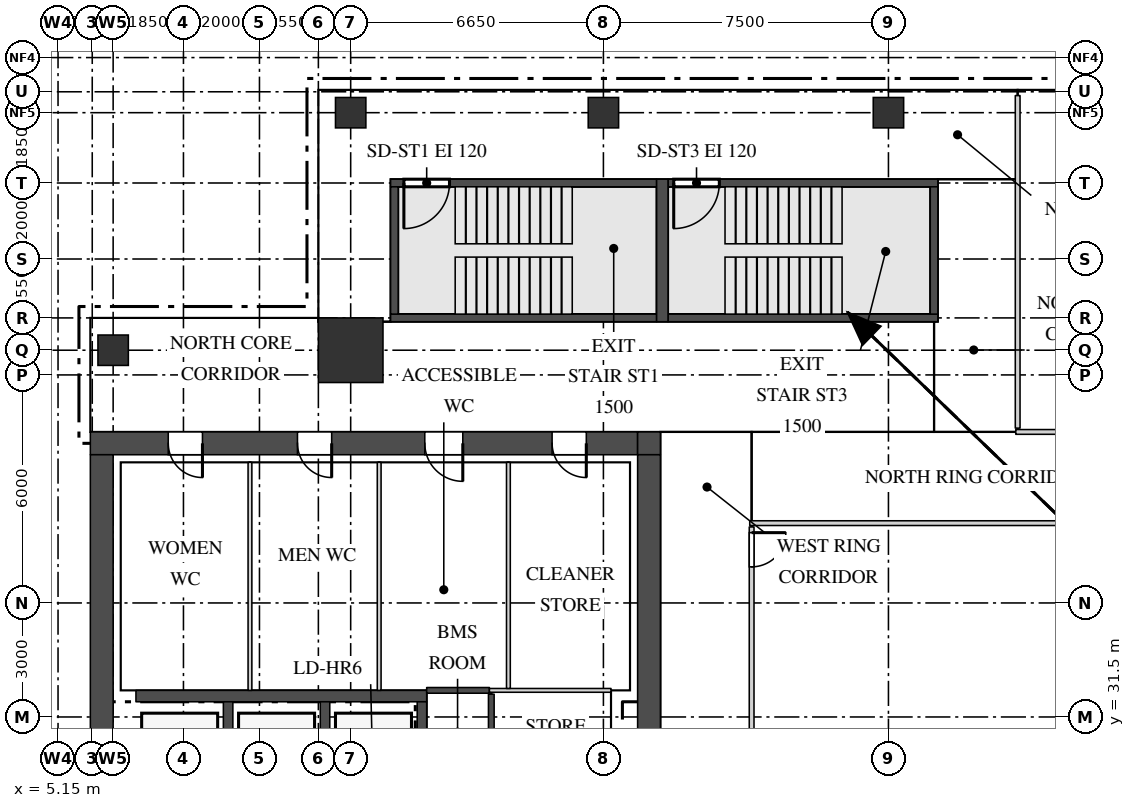
"""IFC4 building model, lengths in metres.
Left out: names, types, materials, properties, quantities, classifications, styles, units other than length and angle.
Written with IfcOpenShell. Run it as: python <this file> out.ifc"""

import sys

from ifc_helpers import new_model, si_unit, direction, frame, frame_2d, origin, origin_2d, place, context, subcontext, project, spatial, rectangle, extrude, source, transform, mapped, element, fill, save


model = new_model("IFC4")
c1 = context("Model", 3, precision=1e-05, world=origin(), true_north=direction((0.0, 1.0)))
c2 = subcontext(c1, "Body", "Model", "MODEL_VIEW")
j1 = project(units=[si_unit("LENGTHUNIT", "METRE"), si_unit("PLANEANGLEUNIT", "RADIAN")], contexts=[c1])
p1 = place(None, origin())
s1 = spatial("IfcSite", under=j1, at=p1, CompositionType="ELEMENT")
p2 = place(p1, origin())
s2 = spatial("IfcBuilding", under=s1, at=p2, CompositionType="ELEMENT")
p3 = place(p2, frame((0.0, 0.0, 318.2)))
s3 = spatial("IfcBuildingStorey", under=s2, at=p3, CompositionType="ELEMENT", Elevation=318.2)
m1 = source(origin(), c2, "Body", "SweptSolid", [
    extrude(rectangle(XDim=14.4, YDim=0.6, at=frame_2d((7.2, 0.0))), origin(), (0.0, 0.0, 1.0), 3.75),
])
p4 = place(p3, frame((6.0, 38.7, 0.0), z_axis=(0.0, 0.0, 1.0), x_axis=(1.0, 0.0, 0.0)))
e1 = element("IfcWall", 1, at=p4, inside=s3, PredefinedType="SHEAR", context=c2, shape_type="MappedRepresentation", body=[
    mapped(m1, transform((0.0, 0.0, 0.0))),
])
m2 = source(origin(), c2, "Body", "SweptSolid", [
    extrude(rectangle(XDim=0.9, YDim=2.1, at=frame_2d((0.45, 1.05))), frame((0.0, 0.31, 0.0), z_axis=(0.0, -1.0, 0.0), x_axis=(1.0, 0.0, 0.0)), (0.0, 0.0, 1.0), 0.62),
])
p5 = place(p4, frame((2.05, 0.0, 0.0)))
e2 = element("IfcOpeningElement", 2, at=p5, cuts=e1, PredefinedType="OPENING", context=c2, shape_type="MappedRepresentation", body=[
    mapped(m2, transform((0.0, 0.0, 0.0))),
])
p6 = place(p4, frame((5.45, 0.0, 0.0)))
e3 = element("IfcOpeningElement", 3, at=p6, cuts=e1, PredefinedType="OPENING", context=c2, shape_type="MappedRepresentation", body=[
    mapped(m2, transform((0.0, 0.0, 0.0))),
])
m3 = source(origin(), c2, "Body", "SweptSolid", [
    extrude(rectangle(XDim=1.0, YDim=2.1, at=frame_2d((0.5, 1.05))), frame((0.0, 0.31, 0.0), z_axis=(0.0, -1.0, 0.0), x_axis=(1.0, 0.0, 0.0)), (0.0, 0.0, 1.0), 0.62),
])
p7 = place(p4, frame((8.8, 0.0, 0.0)))
e4 = element("IfcOpeningElement", 4, at=p7, cuts=e1, PredefinedType="OPENING", context=c2, shape_type="MappedRepresentation", body=[
    mapped(m3, transform((0.0, 0.0, 0.0))),
])
p8 = place(p4, frame((12.15, 0.0, 0.0)))
e5 = element("IfcOpeningElement", 5, at=p8, cuts=e1, PredefinedType="OPENING", context=c2, shape_type="MappedRepresentation", body=[
    mapped(m2, transform((0.0, 0.0, 0.0))),
])
m4 = source(origin(), c2, "Body", "SweptSolid", [
    extrude(rectangle(XDim=0.6, YDim=0.6, at=frame_2d((0.3, 0.0))), origin(), (0.0, 0.0, 1.0), 3.75),
])
p9 = place(p3, frame((20.4, 38.7, 0.0), z_axis=(0.0, 0.0, 1.0), x_axis=(1.0, 0.0, 0.0)))
e6 = element("IfcWall", 6, at=p9, inside=s3, PredefinedType="SHEAR", context=c2, shape_type="MappedRepresentation", body=[
    mapped(m4, transform((0.0, 0.0, 0.0))),
])
m5 = source(origin(), c2, "Body", "SweptSolid", [
    extrude(rectangle(XDim=22.8, YDim=0.6, at=frame_2d((11.4, 0.0))), origin(), (0.0, 0.0, 1.0), 3.75),
])
p10 = place(p3, frame((20.7, 15.6, 0.0), z_axis=(0.0, 0.0, 1.0), x_axis=(0.0, 1.0, 0.0)))
e7 = element("IfcWall", 7, at=p10, inside=s3, PredefinedType="SHEAR", context=c2, shape_type="MappedRepresentation", body=[
    mapped(m5, transform((0.0, 0.0, 0.0))),
])
m6 = source(origin(), c2, "Body", "SweptSolid", [
    extrude(rectangle(XDim=1.8, YDim=2.1, at=frame_2d((0.9, 1.05))), frame((0.0, 0.31, 0.0), z_axis=(0.0, -1.0, 0.0), x_axis=(1.0, 0.0, 0.0)), (0.0, 0.0, 1.0), 0.62),
])
p11 = place(p10, frame((10.9, 0.0, 0.0)))
e8 = element("IfcOpeningElement", 8, at=p11, cuts=e7, PredefinedType="OPENING", context=c2, shape_type="MappedRepresentation", body=[
    mapped(m6, transform((0.0, 0.0, 0.0))),
])
p12 = place(p10, frame((0.55, 0.0, 0.0)))
e9 = element("IfcOpeningElement", 9, at=p12, cuts=e7, PredefinedType="OPENING", context=c2, shape_type="MappedRepresentation", body=[
    mapped(m2, transform((0.0, 0.0, 0.0))),
])
p13 = place(p10, frame((4.1, 0.0, 0.0)))
e10 = element("IfcOpeningElement", 10, at=p13, cuts=e7, PredefinedType="OPENING", context=c2, shape_type="MappedRepresentation", body=[
    mapped(m2, transform((0.0, 0.0, 0.0))),
])
p14 = place(p3, frame((6.3, 15.6, 0.0), z_axis=(0.0, 0.0, 1.0), x_axis=(0.0, 1.0, 0.0)))
e11 = element("IfcWall", 11, at=p14, inside=s3, PredefinedType="SHEAR", context=c2, shape_type="MappedRepresentation", body=[
    mapped(m5, transform((0.0, 0.0, 0.0))),
])
m7 = source(origin(), c2, "Body", "SweptSolid", [
    extrude(rectangle(XDim=7.0, YDim=0.2, at=frame_2d((3.5, 0.0))), origin(), (0.0, 0.0, 1.0), 3.75),
])
p15 = place(p3, frame((13.9, 45.55, 0.0), z_axis=(0.0, 0.0, 1.0), x_axis=(1.0, 0.0, 0.0)))
e12 = element("IfcWall", 12, at=p15, inside=s3, PredefinedType="SHEAR", context=c2, shape_type="MappedRepresentation", body=[
    mapped(m7, transform((0.0, 0.0, 0.0))),
])
m8 = source(origin(), c2, "Body", "SweptSolid", [
    extrude(rectangle(XDim=1.2, YDim=2.1, at=frame_2d((0.6, 1.05))), frame((0.0, 0.11, 0.0), z_axis=(0.0, -1.0, 0.0), x_axis=(1.0, 0.0, 0.0)), (0.0, 0.0, 1.0), 0.22),
])
p16 = place(p15, frame((0.35, 0.0, 0.0)))
e13 = element("IfcOpeningElement", 13, at=p16, cuts=e12, PredefinedType="OPENING", context=c2, shape_type="MappedRepresentation", body=[
    mapped(m8, transform((0.0, 0.0, 0.0))),
])
p17 = place(p3, frame((13.9, 42.0, 0.0), z_axis=(0.0, 0.0, 1.0), x_axis=(1.0, 0.0, 0.0)))
e14 = element("IfcWall", 14, at=p17, inside=s3, PredefinedType="SHEAR", context=c2, shape_type="MappedRepresentation", body=[
    mapped(m7, transform((0.0, 0.0, 0.0))),
])
m9 = source(origin(), c2, "Body", "SweptSolid", [
    extrude(rectangle(XDim=7.1, YDim=0.2, at=frame_2d((3.55, 0.0))), origin(), (0.0, 0.0, 1.0), 3.75),
])
p18 = place(p3, frame((21.2, 45.55, 0.0), z_axis=(0.0, 0.0, 1.0), x_axis=(1.0, 0.0, 0.0)))
e15 = element("IfcWall", 15, at=p18, inside=s3, PredefinedType="SHEAR", context=c2, shape_type="MappedRepresentation", body=[
    mapped(m9, transform((0.0, 0.0, 0.0))),
])
p19 = place(p18, frame((0.15, 0.0, 0.0)))
e16 = element("IfcOpeningElement", 16, at=p19, cuts=e15, PredefinedType="OPENING", context=c2, shape_type="MappedRepresentation", body=[
    mapped(m8, transform((0.0, 0.0, 0.0))),
])
p20 = place(p3, frame((21.2, 42.0, 0.0), z_axis=(0.0, 0.0, 1.0), x_axis=(1.0, 0.0, 0.0)))
e17 = element("IfcWall", 17, at=p20, inside=s3, PredefinedType="SHEAR", context=c2, shape_type="MappedRepresentation", body=[
    mapped(m9, transform((0.0, 0.0, 0.0))),
])
m10 = source(origin(), c2, "Body", "SweptSolid", [
    extrude(rectangle(XDim=3.75, YDim=0.3, at=frame_2d((1.875, 0.0))), origin(), (0.0, 0.0, 1.0), 3.75),
])
p21 = place(p3, frame((21.05, 41.9, 0.0), z_axis=(0.0, 0.0, 1.0), x_axis=(0.0, 1.0, 0.0)))
e18 = element("IfcWall", 18, at=p21, inside=s3, PredefinedType="SHEAR", context=c2, shape_type="MappedRepresentation", body=[
    mapped(m10, transform((0.0, 0.0, 0.0))),
])
m11 = source(origin(), c2, "Body", "SweptSolid", [
    extrude(rectangle(XDim=3.35, YDim=0.2, at=frame_2d((1.675, 0.0))), origin(), (0.0, 0.0, 1.0), 3.75),
])
for number, where, z_axis, x_axis in (
    (19, (14.0, 42.1, 0.0), (0.0, 0.0, 1.0), (0.0, 1.0, 0.0)),
    (20, (28.2, 42.1, 0.0), (0.0, 0.0, 1.0), (0.0, 1.0, 0.0)),
):
    element("IfcWall", number, at=place(p3, frame(where, z_axis=z_axis, x_axis=x_axis)), inside=s3, PredefinedType="SHEAR", context=c2, shape_type="MappedRepresentation", body=[
        mapped(m11, transform((0.0, 0.0, 0.0))),
    ])
m12 = source(origin(), c2, "Body", "SweptSolid", [
    extrude(rectangle(XDim=7.65, YDim=0.3, at=frame_2d((3.825, 0.0))), origin(), (0.0, 0.0, 1.0), 3.75),
])
p22 = place(p3, frame((7.2, 32.05, 0.0), z_axis=(0.0, 0.0, 1.0), x_axis=(1.0, 0.0, 0.0)))
e21 = element("IfcWall", 21, at=p22, inside=s3, PredefinedType="STANDARD", context=c2, shape_type="MappedRepresentation", body=[
    mapped(m12, transform((0.0, 0.0, 0.0))),
])
m13 = source(origin(), c2, "Body", "SweptSolid", [
    extrude(rectangle(XDim=2.4, YDim=0.25, at=frame_2d((1.2, 0.0))), origin(), (0.0, 0.0, 1.0), 3.75),
])
for number, where, z_axis, x_axis in (
    (22, (9.625, 29.5, 0.0), (0.0, 0.0, 1.0), (0.0, 1.0, 0.0)),
    (23, (12.175, 29.5, 0.0), (0.0, 0.0, 1.0), (0.0, 1.0, 0.0)),
    (24, (14.725, 29.5, 0.0), (0.0, 0.0, 1.0), (0.0, 1.0, 0.0)),
):
    element("IfcWall", number, at=place(p3, frame(where, z_axis=z_axis, x_axis=x_axis)), inside=s3, PredefinedType="STANDARD", context=c2, shape_type="MappedRepresentation", body=[
        mapped(m13, transform((0.0, 0.0, 0.0))),
    ])
m14 = source(origin(), c2, "Body", "SweptSolid", [
    extrude(rectangle(XDim=1.7, YDim=1.7, at=origin_2d()), origin(), (0.0, 0.0, 1.0), 3.75),
])
p23 = place(p3, frame((12.85, 41.15, 0.0), z_axis=(0.0, 0.0, 1.0), x_axis=(1.0, 0.0, 0.0)))
e25 = element("IfcColumn", 25, at=p23, inside=s3, PredefinedType="COLUMN", context=c2, shape_type="MappedRepresentation", body=[
    mapped(m14, transform((0.0, 0.0, 0.0))),
])
m15 = source(origin(), c2, "Body", "SweptSolid", [
    extrude(rectangle(XDim=0.8, YDim=0.8, at=origin_2d()), origin(), (0.0, 0.0, 1.0), 3.75),
])
for number, where, z_axis, x_axis in (
    (26, (12.85, 47.4, 0.0), (0.0, 0.0, 1.0), (1.0, 0.0, 0.0)),
    (27, (19.5, 47.4, 0.0), (0.0, 0.0, 1.0), (1.0, 0.0, 0.0)),
    (28, (27.0, 47.4, 0.0), (0.0, 0.0, 1.0), (1.0, 0.0, 0.0)),
    (29, (6.6, 41.15, 0.0), (0.0, 0.0, 1.0), (1.0, 0.0, 0.0)),
):
    element("IfcColumn", number, at=place(p3, frame(where, z_axis=z_axis, x_axis=x_axis)), inside=s3, PredefinedType="COLUMN", context=c2, shape_type="MappedRepresentation", body=[
        mapped(m15, transform((0.0, 0.0, 0.0))),
    ])
m16 = source(origin(), c2, "Body", "SweptSolid", [
    extrude(rectangle(XDim=19.0, YDim=0.125, at=frame_2d((9.5, 0.0))), origin(), (0.0, 0.0, 1.0), 3.8),
])
p24 = place(p3, frame((23.4, 17.5, 0.0), z_axis=(0.0, 0.0, 1.0), x_axis=(0.0, 1.0, 0.0)))
e30 = element("IfcWall", 30, at=p24, inside=s3, PredefinedType="PARTITIONING", context=c2, shape_type="MappedRepresentation", body=[
    mapped(m16, transform((0.0, 0.0, 0.0))),
])
m17 = source(origin(), c2, "Body", "SweptSolid", [
    extrude(rectangle(XDim=1.2, YDim=2.1, at=frame_2d((0.6, 1.05))), frame((0.0, 0.073, 0.0), z_axis=(0.0, -1.0, 0.0), x_axis=(1.0, 0.0, 0.0)), (0.0, 0.0, 1.0), 0.145),
])
p25 = place(p24, frame((8.9, 0.0, 0.0)))
e31 = element("IfcOpeningElement", 31, at=p25, cuts=e30, PredefinedType="OPENING", context=c2, shape_type="MappedRepresentation", body=[
    mapped(m17, transform((0.0, 0.0, 0.0))),
])
m18 = source(origin(), c2, "Body", "SweptSolid", [
    extrude(rectangle(XDim=0.9, YDim=2.1, at=frame_2d((0.45, 1.05))), frame((0.0, 0.073, 0.0), z_axis=(0.0, -1.0, 0.0), x_axis=(1.0, 0.0, 0.0)), (0.0, 0.0, 1.0), 0.145),
])
p26 = place(p24, frame((17.95, 0.0, 0.0)))
e32 = element("IfcOpeningElement", 32, at=p26, cuts=e30, PredefinedType="OPENING", context=c2, shape_type="MappedRepresentation", body=[
    mapped(m18, transform((0.0, 0.0, 0.0))),
])
m19 = source(origin(), c2, "Body", "SweptSolid", [
    extrude(rectangle(XDim=2.8, YDim=0.15, at=frame_2d((1.4, 0.0))), origin(), (0.0, 0.0, 1.0), 3.8),
])
p27 = place(p3, frame((16.55, 29.3, 0.0), z_axis=(0.0, 0.0, 1.0), x_axis=(0.0, 1.0, 0.0)))
e33 = element("IfcWall", 33, at=p27, inside=s3, PredefinedType="PARTITIONING", context=c2, shape_type="MappedRepresentation", body=[
    mapped(m19, transform((0.0, 0.0, 0.0))),
])
m20 = source(origin(), c2, "Body", "SweptSolid", [
    extrude(rectangle(XDim=6.0, YDim=0.1, at=frame_2d((3.0, 0.0))), origin(), (0.0, 0.0, 1.0), 3.8),
])
for number, where, z_axis, x_axis in (
    (34, (10.2, 32.2, 0.0), (0.0, 0.0, 1.0), (0.0, 1.0, 0.0)),
    (35, (13.6, 32.2, 0.0), (0.0, 0.0, 1.0), (0.0, 1.0, 0.0)),
):
    element("IfcWall", number, at=place(p3, frame(where, z_axis=z_axis, x_axis=x_axis)), inside=s3, PredefinedType="PARTITIONING", context=c2, shape_type="MappedRepresentation", body=[
        mapped(m20, transform((0.0, 0.0, 0.0))),
    ])
m21 = source(origin(), c2, "Body", "SweptSolid", [
    extrude(rectangle(XDim=1.65, YDim=0.15, at=frame_2d((0.825, 0.0))), origin(), (0.0, 0.0, 1.0), 3.8),
])
p28 = place(p3, frame((14.85, 32.2, 0.0), z_axis=(0.0, 0.0, 1.0), x_axis=(1.0, 0.0, 0.0)))
e36 = element("IfcWall", 36, at=p28, inside=s3, PredefinedType="PARTITIONING", context=c2, shape_type="MappedRepresentation", body=[
    mapped(m21, transform((0.0, 0.0, 0.0))),
])
m22 = source(origin(), c2, "Body", "SweptSolid", [
    extrude(rectangle(XDim=3.2, YDim=0.1, at=frame_2d((1.6, 0.0))), origin(), (0.0, 0.0, 1.0), 3.8),
])
p29 = place(p3, frame((16.5, 32.2, 0.0), z_axis=(0.0, 0.0, 1.0), x_axis=(1.0, 0.0, 0.0)))
e37 = element("IfcWall", 37, at=p29, inside=s3, PredefinedType="PARTITIONING", context=c2, shape_type="MappedRepresentation", body=[
    mapped(m22, transform((0.0, 0.0, 0.0))),
])
m23 = source(origin(), c2, "Body", "SweptSolid", [
    extrude(rectangle(XDim=5.95, YDim=0.1, at=frame_2d((2.975, 0.0))), origin(), (0.0, 0.0, 1.0), 3.8),
])
p30 = place(p3, frame((17.0, 32.25, 0.0), z_axis=(0.0, 0.0, 1.0), x_axis=(0.0, 1.0, 0.0)))
e38 = element("IfcWall", 38, at=p30, inside=s3, PredefinedType="PARTITIONING", context=c2, shape_type="MappedRepresentation", body=[
    mapped(m23, transform((0.0, 0.0, 0.0))),
])
m24 = source(origin(), c2, "Body", "SweptSolid", [
    extrude(rectangle(XDim=16.7, YDim=0.125, at=frame_2d((8.35, 0.0))), origin(), (0.0, 0.0, 1.0), 3.8),
])
p31 = place(p3, frame((23.35, 36.6, 0.0), z_axis=(0.0, 0.0, 1.0), x_axis=(1.0, 0.0, 0.0)))
e39 = element("IfcWall", 39, at=p31, inside=s3, PredefinedType="PARTITIONING", context=c2, shape_type="MappedRepresentation", body=[
    mapped(m24, transform((0.0, 0.0, 0.0))),
])
m25 = source(origin(), c2, "Body", "SweptSolid", [
    extrude(rectangle(XDim=12.1, YDim=0.125, at=frame_2d((6.05, 0.0))), origin(), (0.0, 0.0, 1.0), 3.8),
])
p32 = place(p3, frame((30.35, 39.0, 0.0), z_axis=(0.0, 0.0, 1.0), x_axis=(1.0, 0.0, 0.0)))
e40 = element("IfcWall", 40, at=p32, inside=s3, PredefinedType="PARTITIONING", context=c2, shape_type="MappedRepresentation", body=[
    mapped(m25, transform((0.0, 0.0, 0.0))),
])
p33 = place(p32, frame((5.25, 0.0, 0.0)))
e41 = element("IfcOpeningElement", 41, at=p33, cuts=e40, PredefinedType="OPENING", context=c2, shape_type="MappedRepresentation", body=[
    mapped(m17, transform((0.0, 0.0, 0.0))),
])
m26 = source(origin(), c2, "Body", "SweptSolid", [
    extrude(rectangle(XDim=8.75, YDim=0.125, at=frame_2d((4.375, 0.0))), origin(), (0.0, 0.0, 1.0), 3.8),
])
p34 = place(p3, frame((30.4, 39.1, 0.0), z_axis=(0.0, 0.0, 1.0), x_axis=(0.0, 1.0, 0.0)))
e42 = element("IfcWall", 42, at=p34, inside=s3, PredefinedType="PARTITIONING", context=c2, shape_type="MappedRepresentation", body=[
    mapped(m26, transform((0.0, 0.0, 0.0))),
])
m27 = source(origin(), c2, "Body", "SweptSolid", [
    extrude(rectangle(XDim=0.9, YDim=2.1, at=frame_2d((0.45, 1.05))), frame((0.0, 0.25, 0.0), z_axis=(0.0, -1.0, 0.0), x_axis=(1.0, 0.0, 0.0)), (0.0, 0.0, 1.0), 0.5),
])
p35 = place(p5, origin())
e43 = element("IfcDoor", 43, at=p35, inside=s3, OperationType="SINGLE_SWING_RIGHT", PredefinedType="DOOR", context=c2, shape_type="MappedRepresentation", body=[
    mapped(m27, transform((0.0, 0.0, 0.0))),
])
fill(e2, e43)
p36 = place(p6, origin())
e44 = element("IfcDoor", 44, at=p36, inside=s3, OperationType="SINGLE_SWING_RIGHT", PredefinedType="DOOR", context=c2, shape_type="MappedRepresentation", body=[
    mapped(m27, transform((0.0, 0.0, 0.0))),
])
fill(e3, e44)
m28 = source(origin(), c2, "Body", "SweptSolid", [
    extrude(rectangle(XDim=1.0, YDim=2.1, at=frame_2d((0.5, 1.05))), frame((0.0, 0.25, 0.0), z_axis=(0.0, -1.0, 0.0), x_axis=(1.0, 0.0, 0.0)), (0.0, 0.0, 1.0), 0.5),
])
p37 = place(p7, origin())
e45 = element("IfcDoor", 45, at=p37, inside=s3, OperationType="SINGLE_SWING_RIGHT", PredefinedType="DOOR", context=c2, shape_type="MappedRepresentation", body=[
    mapped(m28, transform((0.0, 0.0, 0.0))),
])
fill(e4, e45)
p38 = place(p8, origin())
e46 = element("IfcDoor", 46, at=p38, inside=s3, OperationType="SINGLE_SWING_RIGHT", PredefinedType="DOOR", context=c2, shape_type="MappedRepresentation", body=[
    mapped(m27, transform((0.0, 0.0, 0.0))),
])
fill(e5, e46)
m29 = source(origin(), c2, "Body", "SweptSolid", [
    extrude(rectangle(XDim=0.9, YDim=2.1, at=frame_2d((0.45, 1.05))), frame((0.0, 0.025, 0.0), z_axis=(0.0, -1.0, 0.0), x_axis=(1.0, 0.0, 0.0)), (0.0, 0.0, 1.0), 0.05),
])
p39 = place(p26, origin())
e47 = element("IfcDoor", 47, at=p39, inside=s3, OperationType="SINGLE_SWING_RIGHT", PredefinedType="DOOR", context=c2, shape_type="MappedRepresentation", body=[
    mapped(m29, transform((0.0, 0.0, 0.0))),
])
fill(e32, e47)
m30 = source(origin(), c2, "Body", "SweptSolid", [
    extrude(rectangle(XDim=1.2, YDim=2.1, at=frame_2d((0.6, 1.05))), frame((0.0, 0.025, 0.0), z_axis=(0.0, -1.0, 0.0), x_axis=(1.0, 0.0, 0.0)), (0.0, 0.0, 1.0), 0.05),
])
p40 = place(p16, origin())
e48 = element("IfcDoor", 48, at=p40, inside=s3, OperationType="SINGLE_SWING_LEFT", PredefinedType="DOOR", context=c2, shape_type="MappedRepresentation", body=[
    mapped(m30, transform((0.0, 0.0, 0.0))),
])
fill(e13, e48)
p41 = place(p19, origin())
e49 = element("IfcDoor", 49, at=p41, inside=s3, OperationType="SINGLE_SWING_LEFT", PredefinedType="DOOR", context=c2, shape_type="MappedRepresentation", body=[
    mapped(m30, transform((0.0, 0.0, 0.0))),
])
fill(e16, e49)
save(model, sys.argv[1])
